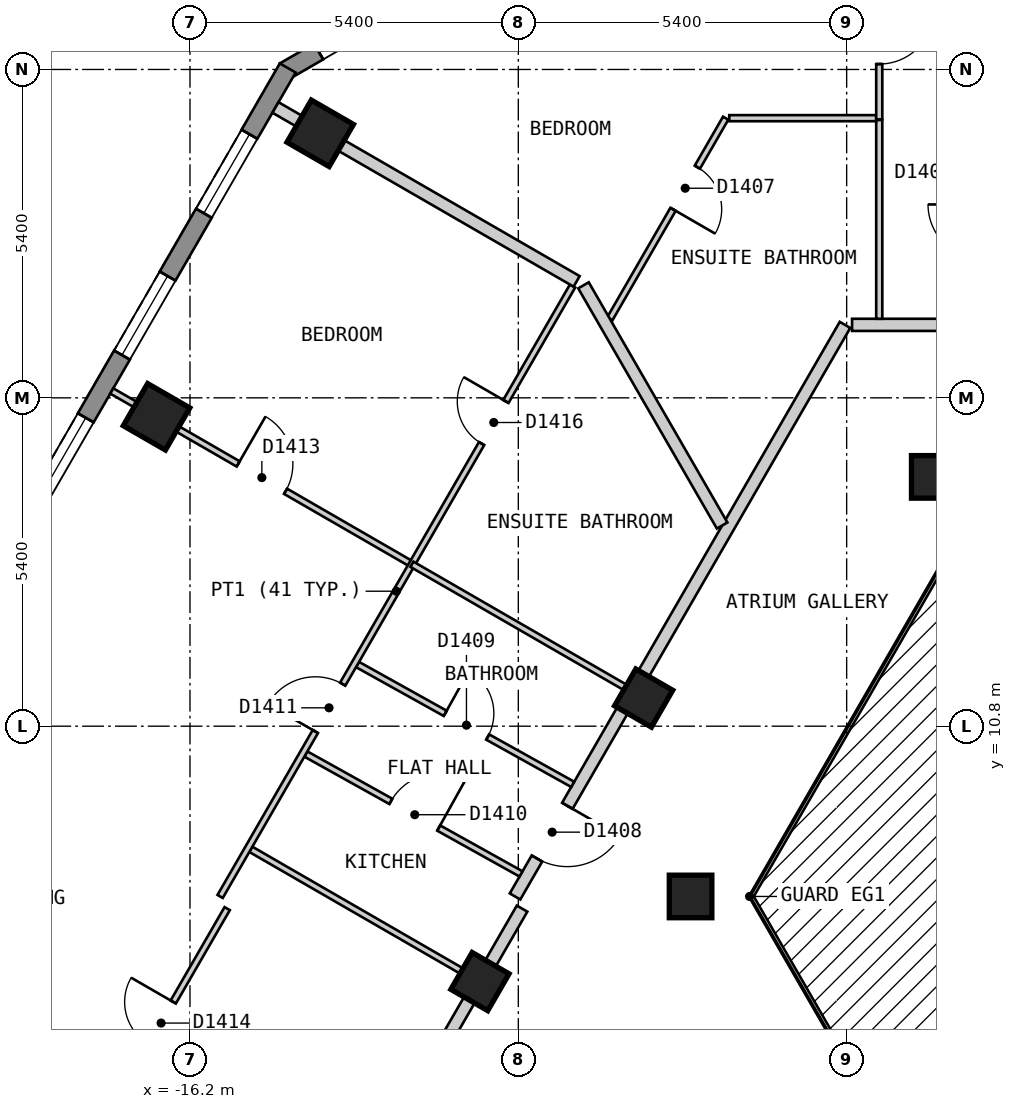
"""IFC4 building model, lengths in metres.
Left out: names, types, materials, properties, quantities, classifications, styles, units other than length and angle.
Written with IfcOpenShell. Run it as: python <this file> out.ifc"""

import sys

from ifc_helpers import new_model, si_unit, direction, frame, frame_2d, origin, origin_2d, place, context, subcontext, project, spatial, polyline, rectangle, outline, extrude, element, fill, save


model = new_model("IFC4")
c1 = context("Model", 3, precision=1e-05, world=origin(), true_north=direction((0.0, 1.0)))
c2 = subcontext(c1, "Body", "Model", "MODEL_VIEW")
j1 = project(units=[si_unit("LENGTHUNIT", "METRE"), si_unit("PLANEANGLEUNIT", "RADIAN")], contexts=[c1])
p1 = place(None, origin())
s1 = spatial("IfcSite", under=j1, at=p1, CompositionType="ELEMENT")
p2 = place(p1, origin())
s2 = spatial("IfcBuilding", under=s1, at=p2, CompositionType="ELEMENT")
p3 = place(p2, frame((0.0, 0.0, 172.2)))
s3 = spatial("IfcBuildingStorey", under=s2, at=p3, CompositionType="ELEMENT", Elevation=172.2)
for number, where, z_axis, x_axis in (
    (1, (-14.058, 20.55, 0.0), (0.0, 0.0, 1.0), (-0.5, -0.866, 0.0)),
    (2, (-16.75, 15.888, 0.0), (0.0, 0.0, 1.0), (-0.5, -0.866, 0.0)),
):
    element("IfcColumn", number, at=place(p3, frame(where, z_axis=z_axis, x_axis=x_axis)), inside=s3, PredefinedType="COLUMN", context=c2, shape_type="SweptSolid", body=[
        extrude(rectangle(XDim=0.8, YDim=0.8, at=origin_2d()), origin(), (0.0, 0.0, 1.0), 3.0),
    ])
for number, where, z_axis, x_axis in (
    (3, (-3.984, 14.9, 0.0), (0.0, 0.0, 1.0), (1.0, 0.0, 0.0)),
    (4, (-8.739, 11.263, 0.0), (0.0, 0.0, 1.0), (-0.5, -0.866, 0.0)),
    (5, (-7.967, 8.0, 0.0), (0.0, 0.0, 1.0), (1.0, 0.0, 0.0)),
    (6, (-11.431, 6.6, 0.0), (0.0, 0.0, 1.0), (-0.5, -0.866, 0.0)),
):
    element("IfcColumn", number, at=place(p3, frame(where, z_axis=z_axis, x_axis=x_axis)), inside=s3, PredefinedType="COLUMN", context=c2, shape_type="SweptSolid", body=[
        extrude(rectangle(XDim=0.7, YDim=0.7, at=origin_2d()), origin(), (0.0, 0.0, 1.0), 3.0),
    ])
p4 = place(p3, frame((-10.317, 24.07, 0.0), z_axis=(0.0, 0.0, 1.0), x_axis=(-0.866022959057, -0.500004234368, 0.0)))
e7 = element("IfcWall", 7, at=p4, inside=s3, PredefinedType="SOLIDWALL", context=c2, shape_type="SweptSolid", body=[
    extrude(outline(polyline([(0.0, -0.15), (5.0, -0.15), (4.92, 0.15), (0.08, 0.15), (0.0, -0.15)])), origin(), (0.0, 0.0, 1.0), 2.7),
])
p5 = place(p4, frame((0.65, 0.0, 0.15)))
e8 = element("IfcOpeningElement", 8, at=p5, cuts=e7, PredefinedType="OPENING", context=c2, shape_type="SweptSolid", body=[
    extrude(rectangle(XDim=1.2, YDim=2.1, at=frame_2d((0.6, 1.05))), frame((0.0, 0.16, 0.0), z_axis=(0.0, -1.0, 0.0), x_axis=(1.0, 0.0, 0.0)), (0.0, 0.0, 1.0), 0.32),
])
p6 = place(p4, frame((3.149, 0.0, 0.15)))
e9 = element("IfcOpeningElement", 9, at=p6, cuts=e7, PredefinedType="OPENING", context=c2, shape_type="SweptSolid", body=[
    extrude(rectangle(XDim=1.2, YDim=2.1, at=frame_2d((0.6, 1.05))), frame((0.0, 0.16, 0.0), z_axis=(0.0, -1.0, 0.0), x_axis=(1.0, 0.0, 0.0)), (0.0, 0.0, 1.0), 0.32),
])
p7 = place(p3, frame((-14.592, 21.625, 0.0), z_axis=(0.0, 0.0, 1.0), x_axis=(-0.500010537973, -0.866019319597, 0.0)))
e10 = element("IfcWall", 10, at=p7, inside=s3, PredefinedType="SOLIDWALL", context=c2, shape_type="SweptSolid", body=[
    extrude(outline(polyline([(0.0, -0.15), (22.863, -0.15), (22.783, 0.15), (0.08, 0.15), (0.0, -0.15)])), origin(), (0.0, 0.0, 1.0), 2.7),
])
p8 = place(p7, frame((1.259, 0.0, 0.15)))
e11 = element("IfcOpeningElement", 11, at=p8, cuts=e10, PredefinedType="OPENING", context=c2, shape_type="SweptSolid", body=[
    extrude(rectangle(XDim=1.5, YDim=2.1, at=frame_2d((0.75, 1.05))), frame((0.0, 0.16, 0.0), z_axis=(0.0, -1.0, 0.0), x_axis=(1.0, 0.0, 0.0)), (0.0, 0.0, 1.0), 0.32),
])
p9 = place(p7, frame((3.952, 0.0, 0.15)))
e12 = element("IfcOpeningElement", 12, at=p9, cuts=e10, PredefinedType="OPENING", context=c2, shape_type="SweptSolid", body=[
    extrude(rectangle(XDim=1.5, YDim=2.1, at=frame_2d((0.75, 1.05))), frame((0.0, 0.16, 0.0), z_axis=(0.0, -1.0, 0.0), x_axis=(1.0, 0.0, 0.0)), (0.0, 0.0, 1.0), 0.32),
])
p10 = place(p7, frame((6.644, 0.0, 0.15)))
e13 = element("IfcOpeningElement", 13, at=p10, cuts=e10, PredefinedType="OPENING", context=c2, shape_type="SweptSolid", body=[
    extrude(rectangle(XDim=1.5, YDim=2.1, at=frame_2d((0.75, 1.05))), frame((0.0, 0.16, 0.0), z_axis=(0.0, -1.0, 0.0), x_axis=(1.0, 0.0, 0.0)), (0.0, 0.0, 1.0), 0.32),
])
p11 = place(p7, frame((9.335, 0.0, 0.15)))
e14 = element("IfcOpeningElement", 14, at=p11, cuts=e10, PredefinedType="OPENING", context=c2, shape_type="SweptSolid", body=[
    extrude(rectangle(XDim=1.5, YDim=2.1, at=frame_2d((0.75, 1.05))), frame((0.0, 0.16, 0.0), z_axis=(0.0, -1.0, 0.0), x_axis=(1.0, 0.0, 0.0)), (0.0, 0.0, 1.0), 0.32),
])
p12 = place(p7, frame((12.028, 0.0, 0.15)))
e15 = element("IfcOpeningElement", 15, at=p12, cuts=e10, PredefinedType="OPENING", context=c2, shape_type="SweptSolid", body=[
    extrude(rectangle(XDim=1.5, YDim=2.1, at=frame_2d((0.75, 1.05))), frame((0.0, 0.16, 0.0), z_axis=(0.0, -1.0, 0.0), x_axis=(1.0, 0.0, 0.0)), (0.0, 0.0, 1.0), 0.32),
])
p13 = place(p7, frame((14.72, 0.0, 0.15)))
e16 = element("IfcOpeningElement", 16, at=p13, cuts=e10, PredefinedType="OPENING", context=c2, shape_type="SweptSolid", body=[
    extrude(rectangle(XDim=1.5, YDim=2.1, at=frame_2d((0.75, 1.05))), frame((0.0, 0.16, 0.0), z_axis=(0.0, -1.0, 0.0), x_axis=(1.0, 0.0, 0.0)), (0.0, 0.0, 1.0), 0.32),
])
p14 = place(p7, frame((17.411, 0.0, 0.15)))
e17 = element("IfcOpeningElement", 17, at=p14, cuts=e10, PredefinedType="OPENING", context=c2, shape_type="SweptSolid", body=[
    extrude(rectangle(XDim=1.5, YDim=2.1, at=frame_2d((0.75, 1.05))), frame((0.0, 0.16, 0.0), z_axis=(0.0, -1.0, 0.0), x_axis=(1.0, 0.0, 0.0)), (0.0, 0.0, 1.0), 0.32),
])
p15 = place(p7, frame((20.104, 0.0, 0.15)))
e18 = element("IfcOpeningElement", 18, at=p15, cuts=e10, PredefinedType="OPENING", context=c2, shape_type="SweptSolid", body=[
    extrude(rectangle(XDim=1.5, YDim=2.1, at=frame_2d((0.75, 1.05))), frame((0.0, 0.16, 0.0), z_axis=(0.0, -1.0, 0.0), x_axis=(1.0, 0.0, 0.0)), (0.0, 0.0, 1.0), 0.32),
])
p16 = place(p3, frame((-5.311, 17.4, 0.0), z_axis=(0.0, 0.0, 1.0), x_axis=(1.0, 0.0, 0.0)))
e19 = element("IfcWall", 19, at=p16, inside=s3, PredefinedType="PARTITIONING", context=c2, shape_type="SweptSolid", body=[
    extrude(rectangle(XDim=10.075, YDim=0.2, at=frame_2d((5.038, 0.0))), origin(), (0.0, 0.0, 1.0), 2.7),
])
p17 = place(p16, frame((2.429, 0.0, 0.0)))
e20 = element("IfcOpeningElement", 20, at=p17, cuts=e19, PredefinedType="OPENING", context=c2, shape_type="SweptSolid", body=[
    extrude(rectangle(XDim=0.9, YDim=2.1, at=frame_2d((0.45, 1.05))), frame((0.0, 0.11, 0.0), z_axis=(0.0, -1.0, 0.0), x_axis=(1.0, 0.0, 0.0)), (0.0, 0.0, 1.0), 0.22),
])
p18 = place(p3, frame((-15.53, -0.501, 0.0), z_axis=(0.0, 0.0, 1.0), x_axis=(0.499952498232, 0.866052827206, 0.0)))
e21 = element("IfcWall", 21, at=p18, inside=s3, PredefinedType="PARTITIONING", context=c2, shape_type="SweptSolid", body=[
    extrude(rectangle(XDim=9.585, YDim=0.2, at=frame_2d((4.792, 0.0))), origin(), (0.0, 0.0, 1.0), 2.7),
])
p19 = place(p3, frame((-10.854, 8.0, 0.0), z_axis=(0.0, 0.0, 1.0), x_axis=(0.499997637144, 0.866026767976, 0.0)))
e22 = element("IfcWall", 22, at=p19, inside=s3, PredefinedType="PARTITIONING", context=c2, shape_type="SweptSolid", body=[
    extrude(rectangle(XDim=10.854, YDim=0.2, at=frame_2d((5.427, 0.0))), origin(), (0.0, 0.0, 1.0), 2.7),
])
p20 = place(p19, frame((0.721, 0.0, 0.0)))
e23 = element("IfcOpeningElement", 23, at=p20, cuts=e22, PredefinedType="OPENING", context=c2, shape_type="SweptSolid", body=[
    extrude(rectangle(XDim=1.0, YDim=2.1, at=frame_2d((0.5, 1.05))), frame((0.0, 0.11, 0.0), z_axis=(0.0, -1.0, 0.0), x_axis=(1.0, 0.0, 0.0)), (0.0, 0.0, 1.0), 0.22),
])
p21 = place(p3, frame((-4.864, 20.769, 0.0), z_axis=(0.0, 0.0, 1.0), x_axis=(0.0, -1.0, 0.0)))
e24 = element("IfcWall", 24, at=p21, inside=s3, PredefinedType="PARTITIONING", context=c2, shape_type="SweptSolid", body=[
    extrude(rectangle(XDim=3.269, YDim=0.1, at=frame_2d((1.635, 0.0))), origin(), (0.0, 0.0, 1.0), 2.7),
])
p22 = place(p3, frame((-13.444, 11.814, 0.0), z_axis=(0.0, 0.0, 1.0), x_axis=(0.873653620945, -0.486548405207, 0.0)))
e25 = element("IfcWall", 25, at=p22, inside=s3, PredefinedType="PARTITIONING", context=c2, shape_type="SweptSolid", body=[
    extrude(rectangle(XDim=4.051, YDim=0.1, at=frame_2d((2.025, 0.0))), origin(), (0.0, 0.0, 1.0), 2.7),
])
p23 = place(p22, frame((1.65, 0.0, 0.0)))
e26 = element("IfcOpeningElement", 26, at=p23, cuts=e25, PredefinedType="OPENING", context=c2, shape_type="SweptSolid", body=[
    extrude(rectangle(XDim=0.8, YDim=2.1, at=frame_2d((0.4, 1.05))), frame((0.0, 0.06, 0.0), z_axis=(0.0, -1.0, 0.0), x_axis=(1.0, 0.0, 0.0)), (0.0, 0.0, 1.0), 0.12),
])
p24 = place(p3, frame((-14.294, 10.342, 0.0), z_axis=(0.0, 0.0, 1.0), x_axis=(0.873582256032, -0.486676527013, 0.0)))
e27 = element("IfcWall", 27, at=p24, inside=s3, PredefinedType="PARTITIONING", context=c2, shape_type="SweptSolid", body=[
    extrude(rectangle(XDim=4.05, YDim=0.1, at=frame_2d((2.025, 0.0))), origin(), (0.0, 0.0, 1.0), 2.7),
])
p25 = place(p24, frame((1.6, 0.0, 0.0)))
e28 = element("IfcOpeningElement", 28, at=p25, cuts=e27, PredefinedType="OPENING", context=c2, shape_type="SweptSolid", body=[
    extrude(rectangle(XDim=0.9, YDim=2.1, at=frame_2d((0.45, 1.05))), frame((0.0, 0.06, 0.0), z_axis=(0.0, -1.0, 0.0), x_axis=(1.0, 0.0, 0.0)), (0.0, 0.0, 1.0), 0.12),
])
p26 = place(p3, frame((-22.87, 6.987, 0.0), z_axis=(0.0, 0.0, 1.0), x_axis=(0.866022959057, -0.500004234368, 0.0)))
e29 = element("IfcWall", 29, at=p26, inside=s3, PredefinedType="PARTITIONING", context=c2, shape_type="SweptSolid", body=[
    extrude(rectangle(XDim=10.0, YDim=0.1, at=frame_2d((5.0, 0.0))), origin(), (0.0, 0.0, 1.0), 2.7),
])
p27 = place(p26, frame((2.5, 0.0, 0.0)))
e30 = element("IfcOpeningElement", 30, at=p27, cuts=e29, PredefinedType="OPENING", context=c2, shape_type="SweptSolid", body=[
    extrude(rectangle(XDim=0.9, YDim=2.1, at=frame_2d((0.45, 1.05))), frame((0.0, 0.06, 0.0), z_axis=(0.0, -1.0, 0.0), x_axis=(1.0, 0.0, 0.0)), (0.0, 0.0, 1.0), 0.12),
])
p28 = place(p3, frame((-15.199, 8.775, 0.0), z_axis=(0.0, 0.0, 1.0), x_axis=(0.866043063166, -0.499969411806, 0.0)))
e31 = element("IfcWall", 31, at=p28, inside=s3, PredefinedType="PARTITIONING", context=c2, shape_type="SweptSolid", body=[
    extrude(rectangle(XDim=4.25, YDim=0.1, at=frame_2d((2.125, 0.0))), origin(), (0.0, 0.0, 1.0), 2.7),
])
p29 = place(p3, frame((-17.486, 16.313, 0.0), z_axis=(0.0, 0.0, 1.0), x_axis=(0.866004402611, -0.500036373335, 0.0)))
e32 = element("IfcWall", 32, at=p29, inside=s3, PredefinedType="PARTITIONING", context=c2, shape_type="SweptSolid", body=[
    extrude(rectangle(XDim=5.7, YDim=0.1, at=frame_2d((2.85, 0.0))), origin(), (0.0, 0.0, 1.0), 2.7),
])
p30 = place(p29, frame((2.4, 0.0, 0.0)))
e33 = element("IfcOpeningElement", 33, at=p30, cuts=e32, PredefinedType="OPENING", context=c2, shape_type="SweptSolid", body=[
    extrude(rectangle(XDim=0.9, YDim=2.1, at=frame_2d((0.45, 1.05))), frame((0.0, 0.06, 0.0), z_axis=(0.0, -1.0, 0.0), x_axis=(1.0, 0.0, 0.0)), (0.0, 0.0, 1.0), 0.12),
])
p31 = place(p3, frame((-7.331, 20.799, 0.0), z_axis=(0.0, 0.0, 1.0), x_axis=(1.0, 0.0, 0.0)))
e34 = element("IfcWall", 34, at=p31, inside=s3, PredefinedType="PARTITIONING", context=c2, shape_type="SweptSolid", body=[
    extrude(rectangle(XDim=2.417, YDim=0.1, at=frame_2d((1.208, 0.0))), origin(), (0.0, 0.0, 1.0), 2.7),
])
p32 = place(p3, frame((-9.295, 17.5, 0.0), z_axis=(0.0, 0.0, 1.0), x_axis=(0.500060839138, 0.865990275442, 0.0)))
e35 = element("IfcWall", 35, at=p32, inside=s3, PredefinedType="PARTITIONING", context=c2, shape_type="SweptSolid", body=[
    extrude(rectangle(XDim=3.81, YDim=0.1, at=frame_2d((1.905, 0.0))), origin(), (0.0, 0.0, 1.0), 2.7),
])
p33 = place(p32, frame((2.079, 0.0, 0.0)))
e36 = element("IfcOpeningElement", 36, at=p33, cuts=e35, PredefinedType="OPENING", context=c2, shape_type="SweptSolid", body=[
    extrude(rectangle(XDim=0.8, YDim=2.1, at=frame_2d((0.4, 1.05))), frame((0.0, 0.06, 0.0), z_axis=(0.0, -1.0, 0.0), x_axis=(1.0, 0.0, 0.0)), (0.0, 0.0, 1.0), 0.12),
])
p34 = place(p3, frame((-15.704, 8.0, 0.0), z_axis=(0.0, 0.0, 1.0), x_axis=(0.500005637941, 0.866022148693, 0.0)))
e37 = element("IfcWall", 37, at=p34, inside=s3, PredefinedType="PARTITIONING", context=c2, shape_type="SweptSolid", body=[
    extrude(rectangle(XDim=11.592, YDim=0.1, at=frame_2d((5.796, 0.0))), origin(), (0.0, 0.0, 1.0), 2.7),
])
p35 = place(p34, frame((3.132, 0.0, 0.0)))
e38 = element("IfcOpeningElement", 38, at=p35, cuts=e37, PredefinedType="OPENING", context=c2, shape_type="SweptSolid", body=[
    extrude(rectangle(XDim=0.9, YDim=2.1, at=frame_2d((0.45, 1.05))), frame((0.0, 0.06, 0.0), z_axis=(0.0, -1.0, 0.0), x_axis=(1.0, 0.0, 0.0)), (0.0, 0.0, 1.0), 0.12),
])
p36 = place(p34, frame((8.6, 0.0, 0.0)))
e39 = element("IfcOpeningElement", 39, at=p36, cuts=e37, PredefinedType="OPENING", context=c2, shape_type="SweptSolid", body=[
    extrude(rectangle(XDim=0.8, YDim=2.1, at=frame_2d((0.4, 1.05))), frame((0.0, 0.06, 0.0), z_axis=(0.0, -1.0, 0.0), x_axis=(1.0, 0.0, 0.0)), (0.0, 0.0, 1.0), 0.12),
])
p37 = place(p3, frame((-4.864, 20.779, 0.0), z_axis=(0.0, 0.0, 1.0), x_axis=(0.0, 1.0, 0.0)))
e40 = element("IfcWall", 40, at=p37, inside=s3, PredefinedType="PARTITIONING", context=c2, shape_type="SweptSolid", body=[
    extrude(rectangle(XDim=3.121, YDim=0.1, at=frame_2d((1.561, 0.0))), origin(), (0.0, 0.0, 1.0), 2.7),
])
p38 = place(p37, frame((0.91, 0.0, 0.0)))
e41 = element("IfcOpeningElement", 41, at=p38, cuts=e40, PredefinedType="OPENING", context=c2, shape_type="SweptSolid", body=[
    extrude(rectangle(XDim=0.9, YDim=2.1, at=frame_2d((0.45, 1.05))), frame((0.0, 0.06, 0.0), z_axis=(0.0, -1.0, 0.0), x_axis=(1.0, 0.0, 0.0)), (0.0, 0.0, 1.0), 0.12),
])
p39 = place(p3, frame((-9.728, 18.05, 0.0), z_axis=(0.0, 0.0, 1.0), x_axis=(0.499921709333, -0.866070600204, 0.0)))
e42 = element("IfcWall", 42, at=p39, inside=s3, PredefinedType="PARTITIONING", context=c2, shape_type="SweptSolid", body=[
    extrude(rectangle(XDim=4.561, YDim=0.2, at=frame_2d((2.28, 0.0))), origin(), (0.0, 0.0, 1.0), 2.7),
])
p40 = place(p3, frame((-14.794, 20.975, 0.0), z_axis=(0.0, 0.0, 1.0), x_axis=(0.865982978614, -0.500073475352, 0.0)))
e43 = element("IfcWall", 43, at=p40, inside=s3, PredefinedType="PARTITIONING", context=c2, shape_type="SweptSolid", body=[
    extrude(rectangle(XDim=5.719, YDim=0.2, at=frame_2d((2.86, 0.0))), origin(), (0.0, 0.0, 1.0), 2.7),
])
p41 = place(p3, frame((-17.761, 4.037, 0.0), z_axis=(0.0, 0.0, 1.0), x_axis=(0.50009692756, 0.865969435399, 0.0)))
e44 = element("IfcWall", 44, at=p41, inside=s3, PredefinedType="PARTITIONING", context=c2, shape_type="SweptSolid", body=[
    extrude(rectangle(XDim=4.345, YDim=0.1, at=frame_2d((2.173, 0.0))), origin(), (0.0, 0.0, 1.0), 2.7),
])
p42 = place(p41, frame((1.772, 0.0, 0.0)))
e45 = element("IfcOpeningElement", 45, at=p42, cuts=e44, PredefinedType="OPENING", context=c2, shape_type="SweptSolid", body=[
    extrude(rectangle(XDim=0.8, YDim=2.1, at=frame_2d((0.4, 1.05))), frame((0.0, 0.06, 0.0), z_axis=(0.0, -1.0, 0.0), x_axis=(1.0, 0.0, 0.0)), (0.0, 0.0, 1.0), 0.12),
])
p43 = place(p3, frame((-12.55, 13.463, 0.0), z_axis=(0.0, 0.0, 1.0), x_axis=(0.86606561423, -0.499930346997, 0.0)))
e46 = element("IfcWall", 46, at=p43, inside=s3, PredefinedType="PARTITIONING", context=c2, shape_type="SweptSolid", body=[
    extrude(rectangle(XDim=4.1, YDim=0.1, at=frame_2d((2.05, 0.0))), origin(), (0.0, 0.0, 1.0), 2.7),
])
p44 = place(p6, origin())
e47 = element("IfcWindow", 47, at=p44, inside=s3, PartitioningType="SINGLE_PANEL", PredefinedType="WINDOW", context=c2, shape_type="SweptSolid", body=[
    extrude(rectangle(XDim=1.2, YDim=2.1, at=frame_2d((0.6, 1.05))), frame((0.0, 0.03, 0.0), z_axis=(0.0, -1.0, 0.0), x_axis=(1.0, 0.0, 0.0)), (0.0, 0.0, 1.0), 0.06),
])
fill(e9, e47)
p45 = place(p8, origin())
e48 = element("IfcWindow", 48, at=p45, inside=s3, PartitioningType="SINGLE_PANEL", PredefinedType="WINDOW", context=c2, shape_type="SweptSolid", body=[
    extrude(rectangle(XDim=1.5, YDim=2.1, at=frame_2d((0.75, 1.05))), frame((0.0, 0.03, 0.0), z_axis=(0.0, -1.0, 0.0), x_axis=(1.0, 0.0, 0.0)), (0.0, 0.0, 1.0), 0.06),
])
fill(e11, e48)
p46 = place(p9, origin())
e49 = element("IfcWindow", 49, at=p46, inside=s3, PartitioningType="SINGLE_PANEL", PredefinedType="WINDOW", context=c2, shape_type="SweptSolid", body=[
    extrude(rectangle(XDim=1.5, YDim=2.1, at=frame_2d((0.75, 1.05))), frame((0.0, 0.03, 0.0), z_axis=(0.0, -1.0, 0.0), x_axis=(1.0, 0.0, 0.0)), (0.0, 0.0, 1.0), 0.06),
])
fill(e12, e49)
p47 = place(p10, origin())
e50 = element("IfcWindow", 50, at=p47, inside=s3, PartitioningType="SINGLE_PANEL", PredefinedType="WINDOW", context=c2, shape_type="SweptSolid", body=[
    extrude(rectangle(XDim=1.5, YDim=2.1, at=frame_2d((0.75, 1.05))), frame((0.0, 0.03, 0.0), z_axis=(0.0, -1.0, 0.0), x_axis=(1.0, 0.0, 0.0)), (0.0, 0.0, 1.0), 0.06),
])
fill(e13, e50)
p48 = place(p38, origin())
e51 = element("IfcDoor", 51, at=p48, inside=s3, OperationType="SINGLE_SWING_RIGHT", PredefinedType="DOOR", context=c2, shape_type="SweptSolid", body=[
    extrude(rectangle(XDim=0.9, YDim=2.1, at=frame_2d((0.45, 1.05))), frame((0.0, 0.025, 0.0), z_axis=(0.0, -1.0, 0.0), x_axis=(1.0, 0.0, 0.0)), (0.0, 0.0, 1.0), 0.05),
])
fill(e41, e51)
p49 = place(p33, origin())
e52 = element("IfcDoor", 52, at=p49, inside=s3, OperationType="SINGLE_SWING_LEFT", PredefinedType="DOOR", context=c2, shape_type="SweptSolid", body=[
    extrude(rectangle(XDim=0.8, YDim=2.1, at=frame_2d((0.4, 1.05))), frame((0.0, 0.025, 0.0), z_axis=(0.0, -1.0, 0.0), x_axis=(1.0, 0.0, 0.0)), (0.0, 0.0, 1.0), 0.05),
])
fill(e36, e52)
p50 = place(p20, origin())
e53 = element("IfcDoor", 53, at=p50, inside=s3, OperationType="SINGLE_SWING_RIGHT", PredefinedType="DOOR", context=c2, shape_type="SweptSolid", body=[
    extrude(rectangle(XDim=1.0, YDim=2.1, at=frame_2d((0.5, 1.05))), frame((0.0, 0.025, 0.0), z_axis=(0.0, -1.0, 0.0), x_axis=(1.0, 0.0, 0.0)), (0.0, 0.0, 1.0), 0.05),
])
fill(e23, e53)
p51 = place(p23, origin())
e54 = element("IfcDoor", 54, at=p51, inside=s3, OperationType="SINGLE_SWING_LEFT", PredefinedType="DOOR", context=c2, shape_type="SweptSolid", body=[
    extrude(rectangle(XDim=0.8, YDim=2.1, at=frame_2d((0.4, 1.05))), frame((0.0, 0.025, 0.0), z_axis=(0.0, -1.0, 0.0), x_axis=(1.0, 0.0, 0.0)), (0.0, 0.0, 1.0), 0.05),
])
fill(e26, e54)
p52 = place(p25, origin())
e55 = element("IfcDoor", 55, at=p52, inside=s3, OperationType="SINGLE_SWING_RIGHT", PredefinedType="DOOR", context=c2, shape_type="SweptSolid", body=[
    extrude(rectangle(XDim=0.9, YDim=2.1, at=frame_2d((0.45, 1.05))), frame((0.0, 0.025, 0.0), z_axis=(0.0, -1.0, 0.0), x_axis=(1.0, 0.0, 0.0)), (0.0, 0.0, 1.0), 0.05),
])
fill(e28, e55)
p53 = place(p35, origin())
e56 = element("IfcDoor", 56, at=p53, inside=s3, OperationType="SINGLE_SWING_LEFT", PredefinedType="DOOR", context=c2, shape_type="SweptSolid", body=[
    extrude(rectangle(XDim=0.9, YDim=2.1, at=frame_2d((0.45, 1.05))), frame((0.0, 0.025, 0.0), z_axis=(0.0, -1.0, 0.0), x_axis=(1.0, 0.0, 0.0)), (0.0, 0.0, 1.0), 0.05),
])
fill(e38, e56)
p54 = place(p30, origin())
e57 = element("IfcDoor", 57, at=p54, inside=s3, OperationType="SINGLE_SWING_LEFT", PredefinedType="DOOR", context=c2, shape_type="SweptSolid", body=[
    extrude(rectangle(XDim=0.9, YDim=2.1, at=frame_2d((0.45, 1.05))), frame((0.0, 0.025, 0.0), z_axis=(0.0, -1.0, 0.0), x_axis=(1.0, 0.0, 0.0)), (0.0, 0.0, 1.0), 0.05),
])
fill(e33, e57)
p55 = place(p42, origin())
e58 = element("IfcDoor", 58, at=p55, inside=s3, OperationType="SINGLE_SWING_RIGHT", PredefinedType="DOOR", context=c2, shape_type="SweptSolid", body=[
    extrude(rectangle(XDim=0.8, YDim=2.1, at=frame_2d((0.4, 1.05))), frame((0.0, 0.025, 0.0), z_axis=(0.0, -1.0, 0.0), x_axis=(1.0, 0.0, 0.0)), (0.0, 0.0, 1.0), 0.05),
])
fill(e45, e58)
p56 = place(p36, origin())
e59 = element("IfcDoor", 59, at=p56, inside=s3, OperationType="SINGLE_SWING_RIGHT", PredefinedType="DOOR", context=c2, shape_type="SweptSolid", body=[
    extrude(rectangle(XDim=0.8, YDim=2.1, at=frame_2d((0.4, 1.05))), frame((0.0, 0.025, 0.0), z_axis=(0.0, -1.0, 0.0), x_axis=(1.0, 0.0, 0.0)), (0.0, 0.0, 1.0), 0.05),
])
fill(e39, e59)
save(model, sys.argv[1])
